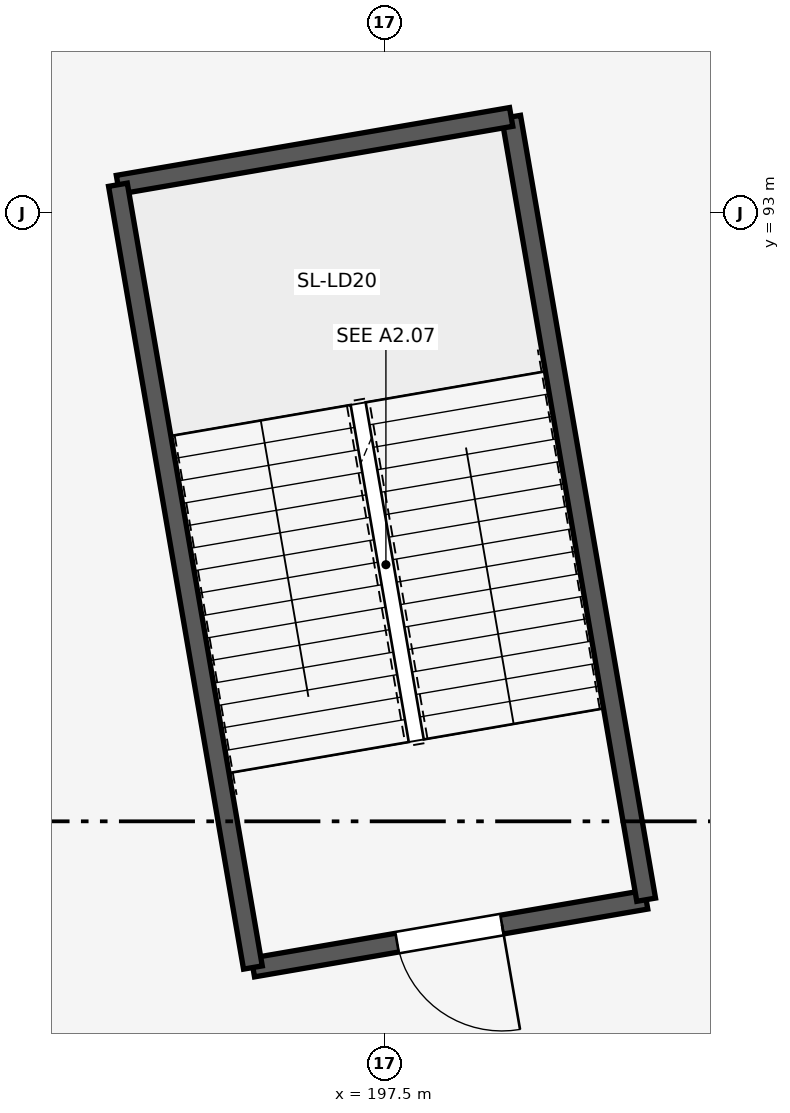
"""IFC4 building model, lengths in metres.
Left out: names, types, materials, properties, quantities, classifications, styles, units other than length and angle.
Written with IfcOpenShell. Run it as: python <this file> out.ifc"""

import sys

from ifc_helpers import new_model, si_unit, direction, frame, frame_2d, origin, place, context, subcontext, project, spatial, rectangle, extrude, element, fill, save


model = new_model("IFC4")
c1 = context("Model", 3, precision=1e-05, world=origin(), true_north=direction((0.0, 1.0)))
c2 = subcontext(c1, "Body", "Model", "MODEL_VIEW")
j1 = project(units=[si_unit("LENGTHUNIT", "METRE"), si_unit("PLANEANGLEUNIT", "RADIAN")], contexts=[c1])
p1 = place(None, origin())
s1 = spatial("IfcSite", under=j1, at=p1, CompositionType="ELEMENT")
p2 = place(p1, origin())
s2 = spatial("IfcBuilding", under=s1, at=p2, CompositionType="ELEMENT")
p3 = place(p2, frame((0.0, 0.0, 5.4)))
s3 = spatial("IfcBuildingStorey", under=s2, at=p3, CompositionType="ELEMENT", Elevation=5.4)
p4 = place(p3, frame((195.762, 83.077, 0.0), z_axis=(0.0, 0.0, 1.0), x_axis=(0.985457162135, 0.16992404655, 0.0)))
e1 = element("IfcWall", 1, at=p4, inside=s3, PredefinedType="SHEAR", context=c2, shape_type="SweptSolid", body=[
    extrude(rectangle(XDim=5.25, YDim=0.25, at=frame_2d((2.625, 0.0))), origin(), (0.0, 0.0, 1.0), 4.92),
])
p5 = place(p4, frame((1.925, 0.0, 0.0)))
e2 = element("IfcOpeningElement", 2, at=p5, cuts=e1, PredefinedType="OPENING", context=c2, shape_type="SweptSolid", body=[
    extrude(rectangle(XDim=1.4, YDim=2.2, at=frame_2d((0.7, 1.1))), frame((0.0, 0.135, 0.0), z_axis=(0.0, -1.0, 0.0), x_axis=(1.0, 0.0, 0.0)), (0.0, 0.0, 1.0), 0.27),
])
p6 = place(p3, frame((200.936, 83.969, 0.0), z_axis=(0.0, 0.0, 1.0), x_axis=(-0.169938992676, 0.985454584833, 0.0)))
e3 = element("IfcWall", 3, at=p6, inside=s3, PredefinedType="SHEAR", context=c2, shape_type="SweptSolid", body=[
    extrude(rectangle(XDim=10.45, YDim=0.25, at=frame_2d((5.225, 0.0))), origin(), (0.0, 0.0, 1.0), 4.92),
])
p7 = place(p3, frame((199.16, 94.267, 0.0), z_axis=(0.0, 0.0, 1.0), x_axis=(-0.985457162135, -0.16992404655, 0.0)))
e4 = element("IfcWall", 4, at=p7, inside=s3, PredefinedType="SHEAR", context=c2, shape_type="SweptSolid", body=[
    extrude(rectangle(XDim=5.25, YDim=0.25, at=frame_2d((2.625, 0.0))), origin(), (0.0, 0.0, 1.0), 4.92),
])
p8 = place(p3, frame((193.987, 93.375, 0.0), z_axis=(0.0, 0.0, 1.0), x_axis=(0.169938992676, -0.985454584833, 0.0)))
e5 = element("IfcWall", 5, at=p8, inside=s3, PredefinedType="SHEAR", context=c2, shape_type="SweptSolid", body=[
    extrude(rectangle(XDim=10.45, YDim=0.25, at=frame_2d((5.225, 0.0))), origin(), (0.0, 0.0, 1.0), 4.92),
])
p9 = place(p5, frame((1.4, 0.0, 0.0), z_axis=(0.0, 0.0, 1.0), x_axis=(-1.0, 0.0, 0.0)))
e6 = element("IfcDoor", 6, at=p9, inside=s3, OperationType="SINGLE_SWING_LEFT", PredefinedType="DOOR", context=c2, shape_type="SweptSolid", body=[
    extrude(rectangle(XDim=1.4, YDim=2.2, at=frame_2d((0.7, 1.1))), frame((0.0, 0.025, 0.0), z_axis=(0.0, -1.0, 0.0), x_axis=(1.0, 0.0, 0.0)), (0.0, 0.0, 1.0), 0.05),
])
fill(e2, e6)
save(model, sys.argv[1])
